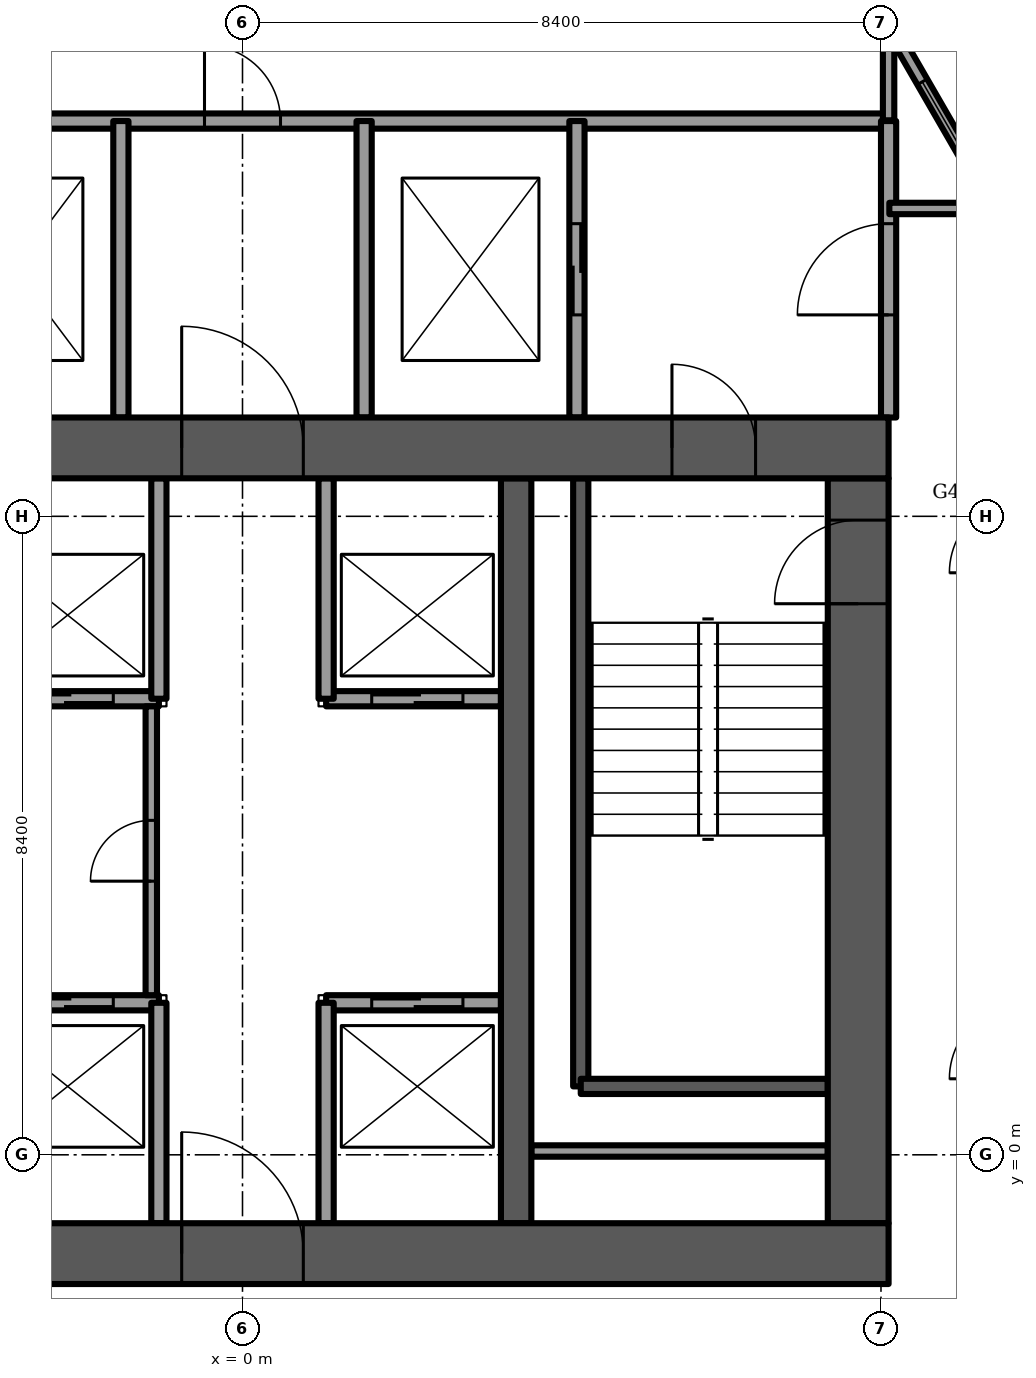
"""IFC4 building model, lengths in metres.
Left out: names, types, materials, properties, quantities, classifications, styles, units other than length and angle.
Written with IfcOpenShell. Run it as: python <this file> out.ifc"""

import sys

from ifc_helpers import new_model, si_unit, direction, frame, frame_2d, origin, place, context, subcontext, project, spatial, rectangle, extrude, element, fill, save


model = new_model("IFC4")
c1 = context("Model", 3, precision=1e-05, world=origin(), true_north=direction((0.0, 1.0)))
c2 = subcontext(c1, "Body", "Model", "MODEL_VIEW")
j1 = project(units=[si_unit("LENGTHUNIT", "METRE"), si_unit("PLANEANGLEUNIT", "RADIAN")], contexts=[c1])
p1 = place(None, origin())
s1 = spatial("IfcSite", under=j1, at=p1, CompositionType="ELEMENT")
p2 = place(p1, origin())
s2 = spatial("IfcBuilding", under=s1, at=p2, CompositionType="ELEMENT")
p3 = place(p2, frame((0.0, 0.0, 179.5)))
s3 = spatial("IfcBuildingStorey", under=s2, at=p3, CompositionType="ELEMENT", Elevation=179.5)
p4 = place(p3, frame((-8.5, -1.3, -0.3), z_axis=(0.0, 0.0, 1.0), x_axis=(1.0, 0.0, 0.0)))
e1 = element("IfcWall", 1, at=p4, inside=s3, PredefinedType="SHEAR", context=c2, shape_type="SweptSolid", body=[
    extrude(rectangle(XDim=17.0, YDim=0.8, at=frame_2d((8.5, 0.0))), origin(), (0.0, 0.0, 1.0), 3.75),
])
p5 = place(p4, frame((7.7, 0.0, 0.0)))
e2 = element("IfcOpeningElement", 2, at=p5, cuts=e1, PredefinedType="OPENING", context=c2, shape_type="SweptSolid", body=[
    extrude(rectangle(XDim=1.6, YDim=2.1, at=frame_2d((0.8, 1.05))), frame((0.0, 0.4, 0.0), z_axis=(0.0, -1.0, 0.0), x_axis=(1.0, 0.0, 0.0)), (0.0, 0.0, 1.0), 0.8),
])
p6 = place(p3, frame((-8.5, 9.3, -0.3), z_axis=(0.0, 0.0, 1.0), x_axis=(1.0, 0.0, 0.0)))
e3 = element("IfcWall", 3, at=p6, inside=s3, PredefinedType="SHEAR", context=c2, shape_type="SweptSolid", body=[
    extrude(rectangle(XDim=17.0, YDim=0.8, at=frame_2d((8.5, 0.0))), origin(), (0.0, 0.0, 1.0), 3.75),
])
p7 = place(p6, frame((7.7, 0.0, 0.0)))
e4 = element("IfcOpeningElement", 4, at=p7, cuts=e3, PredefinedType="OPENING", context=c2, shape_type="SweptSolid", body=[
    extrude(rectangle(XDim=1.6, YDim=2.1, at=frame_2d((0.8, 1.05))), frame((0.0, 0.4, 0.0), z_axis=(0.0, -1.0, 0.0), x_axis=(1.0, 0.0, 0.0)), (0.0, 0.0, 1.0), 0.8),
])
p8 = place(p6, frame((1.75, 0.0, 0.0)))
e5 = element("IfcOpeningElement", 5, at=p8, cuts=e3, PredefinedType="OPENING", context=c2, shape_type="SweptSolid", body=[
    extrude(rectangle(XDim=1.1, YDim=2.1, at=frame_2d((0.55, 1.05))), frame((0.0, 0.4, 0.0), z_axis=(0.0, -1.0, 0.0), x_axis=(1.0, 0.0, 0.0)), (0.0, 0.0, 1.0), 0.8),
])
p9 = place(p6, frame((14.15, 0.0, 0.0)))
e6 = element("IfcOpeningElement", 6, at=p9, cuts=e3, PredefinedType="OPENING", context=c2, shape_type="SweptSolid", body=[
    extrude(rectangle(XDim=1.1, YDim=2.1, at=frame_2d((0.55, 1.05))), frame((0.0, 0.4, 0.0), z_axis=(0.0, -1.0, 0.0), x_axis=(1.0, 0.0, 0.0)), (0.0, 0.0, 1.0), 0.8),
])
p10 = place(p3, frame((8.1, -0.9, -0.3), z_axis=(0.0, 0.0, 1.0), x_axis=(0.0, 1.0, 0.0)))
e7 = element("IfcWall", 7, at=p10, inside=s3, PredefinedType="SHEAR", context=c2, shape_type="SweptSolid", body=[
    extrude(rectangle(XDim=9.8, YDim=0.8, at=frame_2d((4.9, 0.0))), origin(), (0.0, 0.0, 1.0), 3.75),
])
p11 = place(p10, frame((8.15, 0.0, 0.0)))
e8 = element("IfcOpeningElement", 8, at=p11, cuts=e7, PredefinedType="OPENING", context=c2, shape_type="SweptSolid", body=[
    extrude(rectangle(XDim=1.1, YDim=2.1, at=frame_2d((0.55, 1.05))), frame((0.0, 0.4, 0.0), z_axis=(0.0, -1.0, 0.0), x_axis=(1.0, 0.0, 0.0)), (0.0, 0.0, 1.0), 0.8),
])
p12 = place(p3, frame((3.6, -0.9, -0.3), z_axis=(0.0, 0.0, 1.0), x_axis=(0.0, 1.0, 0.0)))
e9 = element("IfcWall", 9, at=p12, inside=s3, PredefinedType="SHEAR", context=c2, shape_type="SweptSolid", body=[
    extrude(rectangle(XDim=9.8, YDim=0.4, at=frame_2d((4.9, 0.0))), origin(), (0.0, 0.0, 1.0), 3.75),
])
p13 = place(p3, frame((17.145, -0.089, 0.0), z_axis=(0.0, 0.0, 1.0), x_axis=(-0.499999728453, 0.866025560562, 0.0)))
e10 = element("IfcWall", 10, at=p13, inside=s3, PredefinedType="SOLIDWALL", context=c2, shape_type="SweptSolid", body=[
    extrude(rectangle(XDim=20.071, YDim=0.15, at=frame_2d((10.035, 0.0))), origin(), (0.0, 0.0, 1.0), 3.45),
])
p14 = place(p13, frame((0.55, 0.0, 0.15)))
e11 = element("IfcOpeningElement", 11, at=p14, cuts=e10, PredefinedType="OPENING", context=c2, shape_type="SweptSolid", body=[
    extrude(rectangle(XDim=1.6, YDim=2.85, at=frame_2d((0.8, 1.425))), frame((0.0, 0.075, 0.0), z_axis=(0.0, -1.0, 0.0), x_axis=(1.0, 0.0, 0.0)), (0.0, 0.0, 1.0), 0.15),
])
p15 = place(p13, frame((2.75, 0.0, 0.15)))
e12 = element("IfcOpeningElement", 12, at=p15, cuts=e10, PredefinedType="OPENING", context=c2, shape_type="SweptSolid", body=[
    extrude(rectangle(XDim=1.4, YDim=2.85, at=frame_2d((0.7, 1.425))), frame((0.0, 0.075, 0.0), z_axis=(0.0, -1.0, 0.0), x_axis=(1.0, 0.0, 0.0)), (0.0, 0.0, 1.0), 0.15),
])
p16 = place(p13, frame((5.854, 0.0, 0.15)))
e13 = element("IfcOpeningElement", 13, at=p16, cuts=e10, PredefinedType="OPENING", context=c2, shape_type="SweptSolid", body=[
    extrude(rectangle(XDim=0.9, YDim=2.85, at=frame_2d((0.45, 1.425))), frame((0.0, 0.075, 0.0), z_axis=(0.0, -1.0, 0.0), x_axis=(1.0, 0.0, 0.0)), (0.0, 0.0, 1.0), 0.15),
])
p17 = place(p13, frame((6.95, 0.0, 0.15)))
e14 = element("IfcOpeningElement", 14, at=p17, cuts=e10, PredefinedType="OPENING", context=c2, shape_type="SweptSolid", body=[
    extrude(rectangle(XDim=1.4, YDim=2.85, at=frame_2d((0.7, 1.425))), frame((0.0, 0.075, 0.0), z_axis=(0.0, -1.0, 0.0), x_axis=(1.0, 0.0, 0.0)), (0.0, 0.0, 1.0), 0.15),
])
p18 = place(p13, frame((8.95, 0.0, 0.15)))
e15 = element("IfcOpeningElement", 15, at=p18, cuts=e10, PredefinedType="OPENING", context=c2, shape_type="SweptSolid", body=[
    extrude(rectangle(XDim=1.6, YDim=2.85, at=frame_2d((0.8, 1.425))), frame((0.0, 0.075, 0.0), z_axis=(0.0, -1.0, 0.0), x_axis=(1.0, 0.0, 0.0)), (0.0, 0.0, 1.0), 0.15),
])
p19 = place(p13, frame((11.15, 0.0, 0.15)))
e16 = element("IfcOpeningElement", 16, at=p19, cuts=e10, PredefinedType="OPENING", context=c2, shape_type="SweptSolid", body=[
    extrude(rectangle(XDim=1.4, YDim=2.85, at=frame_2d((0.7, 1.425))), frame((0.0, 0.075, 0.0), z_axis=(0.0, -1.0, 0.0), x_axis=(1.0, 0.0, 0.0)), (0.0, 0.0, 1.0), 0.15),
])
p20 = place(p13, frame((14.803, 0.0, 0.15)))
e17 = element("IfcOpeningElement", 17, at=p20, cuts=e10, PredefinedType="OPENING", context=c2, shape_type="SweptSolid", body=[
    extrude(rectangle(XDim=1.6, YDim=2.85, at=frame_2d((0.8, 1.425))), frame((0.0, 0.075, 0.0), z_axis=(0.0, -1.0, 0.0), x_axis=(1.0, 0.0, 0.0)), (0.0, 0.0, 1.0), 0.15),
])
p21 = place(p13, frame((18.019, 0.0, 0.15)))
e18 = element("IfcOpeningElement", 18, at=p21, cuts=e10, PredefinedType="OPENING", context=c2, shape_type="SweptSolid", body=[
    extrude(rectangle(XDim=1.6, YDim=2.73, at=frame_2d((0.8, 1.365))), frame((0.0, 0.075, 0.0), z_axis=(0.0, -1.0, 0.0), x_axis=(1.0, 0.0, 0.0)), (0.0, 0.0, 1.0), 0.15),
])
p22 = place(p3, frame((-3.4, 2.0, 0.0), z_axis=(0.0, 0.0, 1.0), x_axis=(1.0, 0.0, 0.0)))
e19 = element("IfcWall", 19, at=p22, inside=s3, PredefinedType="PARTITIONING", context=c2, shape_type="SweptSolid", body=[
    extrude(rectangle(XDim=2.3, YDim=0.2, at=frame_2d((1.15, 0.0))), origin(), (0.0, 0.0, 1.0), 3.45),
])
p23 = place(p22, frame((0.5, 0.0, 0.0)))
e20 = element("IfcOpeningElement", 20, at=p23, cuts=e19, PredefinedType="OPENING", context=c2, shape_type="SweptSolid", body=[
    extrude(rectangle(XDim=1.2, YDim=2.1, at=frame_2d((0.6, 1.05))), frame((0.0, 0.1, 0.0), z_axis=(0.0, -1.0, 0.0), x_axis=(1.0, 0.0, 0.0)), (0.0, 0.0, 1.0), 0.2),
])
p24 = place(p3, frame((-3.4, 6.0, 0.0), z_axis=(0.0, 0.0, 1.0), x_axis=(1.0, 0.0, 0.0)))
e21 = element("IfcWall", 21, at=p24, inside=s3, PredefinedType="PARTITIONING", context=c2, shape_type="SweptSolid", body=[
    extrude(rectangle(XDim=2.3, YDim=0.2, at=frame_2d((1.15, 0.0))), origin(), (0.0, 0.0, 1.0), 3.45),
])
p25 = place(p24, frame((0.5, 0.0, 0.0)))
e22 = element("IfcOpeningElement", 22, at=p25, cuts=e21, PredefinedType="OPENING", context=c2, shape_type="SweptSolid", body=[
    extrude(rectangle(XDim=1.2, YDim=2.1, at=frame_2d((0.6, 1.05))), frame((0.0, 0.1, 0.0), z_axis=(0.0, -1.0, 0.0), x_axis=(1.0, 0.0, 0.0)), (0.0, 0.0, 1.0), 0.2),
])
p26 = place(p3, frame((1.1, 2.0, 0.0), z_axis=(0.0, 0.0, 1.0), x_axis=(1.0, 0.0, 0.0)))
e23 = element("IfcWall", 23, at=p26, inside=s3, PredefinedType="PARTITIONING", context=c2, shape_type="SweptSolid", body=[
    extrude(rectangle(XDim=2.3, YDim=0.2, at=frame_2d((1.15, 0.0))), origin(), (0.0, 0.0, 1.0), 3.45),
])
p27 = place(p26, frame((0.6, 0.0, 0.0)))
e24 = element("IfcOpeningElement", 24, at=p27, cuts=e23, PredefinedType="OPENING", context=c2, shape_type="SweptSolid", body=[
    extrude(rectangle(XDim=1.2, YDim=2.1, at=frame_2d((0.6, 1.05))), frame((0.0, 0.1, 0.0), z_axis=(0.0, -1.0, 0.0), x_axis=(1.0, 0.0, 0.0)), (0.0, 0.0, 1.0), 0.2),
])
p28 = place(p3, frame((1.1, 6.0, 0.0), z_axis=(0.0, 0.0, 1.0), x_axis=(1.0, 0.0, 0.0)))
e25 = element("IfcWall", 25, at=p28, inside=s3, PredefinedType="PARTITIONING", context=c2, shape_type="SweptSolid", body=[
    extrude(rectangle(XDim=2.3, YDim=0.2, at=frame_2d((1.15, 0.0))), origin(), (0.0, 0.0, 1.0), 3.45),
])
p29 = place(p28, frame((0.6, 0.0, 0.0)))
e26 = element("IfcOpeningElement", 26, at=p29, cuts=e25, PredefinedType="OPENING", context=c2, shape_type="SweptSolid", body=[
    extrude(rectangle(XDim=1.2, YDim=2.1, at=frame_2d((0.6, 1.05))), frame((0.0, 0.1, 0.0), z_axis=(0.0, -1.0, 0.0), x_axis=(1.0, 0.0, 0.0)), (0.0, 0.0, 1.0), 0.2),
])
for number, where, z_axis, x_axis in (
    (27, (-1.1, -0.9, 0.0), (0.0, 0.0, 1.0), (0.0, 1.0, 0.0)),
    (28, (1.1, -0.9, 0.0), (0.0, 0.0, 1.0), (0.0, 1.0, 0.0)),
    (29, (-1.1, 6.0, 0.0), (0.0, 0.0, 1.0), (0.0, 1.0, 0.0)),
    (30, (1.1, 6.0, 0.0), (0.0, 0.0, 1.0), (0.0, 1.0, 0.0)),
):
    element("IfcWall", number, at=place(p3, frame(where, z_axis=z_axis, x_axis=x_axis)), inside=s3, PredefinedType="PARTITIONING", context=c2, shape_type="SweptSolid", body=[
        extrude(rectangle(XDim=2.9, YDim=0.2, at=frame_2d((1.45, 0.0))), origin(), (0.0, 0.0, 1.0), 3.45),
    ])
p30 = place(p3, frame((4.45, 0.9, -0.3), z_axis=(0.0, 0.0, 1.0), x_axis=(0.0, 1.0, 0.0)))
e31 = element("IfcWall", 31, at=p30, inside=s3, PredefinedType="SOLIDWALL", context=c2, shape_type="SweptSolid", body=[
    extrude(rectangle(XDim=8.0, YDim=0.2, at=frame_2d((4.0, 0.0))), origin(), (0.0, 0.0, 1.0), 3.75),
])
p31 = place(p3, frame((4.45, 0.9, -0.3), z_axis=(0.0, 0.0, 1.0), x_axis=(1.0, 0.0, 0.0)))
e32 = element("IfcWall", 32, at=p31, inside=s3, PredefinedType="SOLIDWALL", context=c2, shape_type="SweptSolid", body=[
    extrude(rectangle(XDim=3.25, YDim=0.2, at=frame_2d((1.625, 0.0))), origin(), (0.0, 0.0, 1.0), 3.75),
])
p32 = place(p3, frame((3.8, 0.05, 0.0), z_axis=(0.0, 0.0, 1.0), x_axis=(1.0, 0.0, 0.0)))
e33 = element("IfcWall", 33, at=p32, inside=s3, PredefinedType="PARTITIONING", context=c2, shape_type="SweptSolid", body=[
    extrude(rectangle(XDim=3.9, YDim=0.15, at=frame_2d((1.95, 0.0))), origin(), (0.0, 0.0, 1.0), 3.45),
])
p33 = place(p3, frame((-8.5, 13.6, 0.0), z_axis=(0.0, 0.0, 1.0), x_axis=(1.0, 0.0, 0.0)))
e34 = element("IfcWall", 34, at=p33, inside=s3, PredefinedType="PARTITIONING", context=c2, shape_type="SweptSolid", body=[
    extrude(rectangle(XDim=17.0, YDim=0.2, at=frame_2d((8.5, 0.0))), origin(), (0.0, 0.0, 1.0), 3.45),
])
p34 = place(p33, frame((8.0, 0.0, 0.0)))
e35 = element("IfcOpeningElement", 35, at=p34, cuts=e34, PredefinedType="OPENING", context=c2, shape_type="SweptSolid", body=[
    extrude(rectangle(XDim=1.0, YDim=2.1, at=frame_2d((0.5, 1.05))), frame((0.0, 0.1, 0.0), z_axis=(0.0, -1.0, 0.0), x_axis=(1.0, 0.0, 0.0)), (0.0, 0.0, 1.0), 0.2),
])
p35 = place(p3, frame((8.5, 9.7, 0.0), z_axis=(0.0, 0.0, 1.0), x_axis=(0.0, 1.0, 0.0)))
e36 = element("IfcWall", 36, at=p35, inside=s3, PredefinedType="PARTITIONING", context=c2, shape_type="SweptSolid", body=[
    extrude(rectangle(XDim=3.9, YDim=0.2, at=frame_2d((1.95, 0.0))), origin(), (0.0, 0.0, 1.0), 3.45),
])
p36 = place(p35, frame((1.35, 0.0, 0.0)))
e37 = element("IfcOpeningElement", 37, at=p36, cuts=e36, PredefinedType="OPENING", context=c2, shape_type="SweptSolid", body=[
    extrude(rectangle(XDim=1.2, YDim=2.1, at=frame_2d((0.6, 1.05))), frame((0.0, 0.1, 0.0), z_axis=(0.0, -1.0, 0.0), x_axis=(1.0, 0.0, 0.0)), (0.0, 0.0, 1.0), 0.2),
])
p37 = place(p3, frame((4.4, 9.7, 0.0), z_axis=(0.0, 0.0, 1.0), x_axis=(0.0, 1.0, 0.0)))
e38 = element("IfcWall", 38, at=p37, inside=s3, PredefinedType="PARTITIONING", context=c2, shape_type="SweptSolid", body=[
    extrude(rectangle(XDim=3.9, YDim=0.2, at=frame_2d((1.95, 0.0))), origin(), (0.0, 0.0, 1.0), 3.45),
])
p38 = place(p37, frame((1.35, 0.0, 0.0)))
e39 = element("IfcOpeningElement", 39, at=p38, cuts=e38, PredefinedType="OPENING", context=c2, shape_type="SweptSolid", body=[
    extrude(rectangle(XDim=1.2, YDim=2.1, at=frame_2d((0.6, 1.05))), frame((0.0, 0.1, 0.0), z_axis=(0.0, -1.0, 0.0), x_axis=(1.0, 0.0, 0.0)), (0.0, 0.0, 1.0), 0.2),
])
for number, where, z_axis, x_axis in (
    (40, (-1.6, 9.7, 0.0), (0.0, 0.0, 1.0), (0.0, 1.0, 0.0)),
    (41, (1.6, 9.7, 0.0), (0.0, 0.0, 1.0), (0.0, 1.0, 0.0)),
):
    element("IfcWall", number, at=place(p3, frame(where, z_axis=z_axis, x_axis=x_axis)), inside=s3, PredefinedType="PARTITIONING", context=c2, shape_type="SweptSolid", body=[
        extrude(rectangle(XDim=3.9, YDim=0.2, at=frame_2d((1.95, 0.0))), origin(), (0.0, 0.0, 1.0), 3.45),
    ])
p39 = place(p3, frame((-1.2, 2.1, 0.0), z_axis=(0.0, 0.0, 1.0), x_axis=(0.0, 1.0, 0.0)))
e42 = element("IfcWall", 42, at=p39, inside=s3, PredefinedType="PARTITIONING", context=c2, shape_type="SweptSolid", body=[
    extrude(rectangle(XDim=3.8, YDim=0.15, at=frame_2d((1.9, 0.0))), origin(), (0.0, 0.0, 1.0), 3.45),
])
p40 = place(p39, frame((1.5, 0.0, 0.0)))
e43 = element("IfcOpeningElement", 43, at=p40, cuts=e42, PredefinedType="OPENING", context=c2, shape_type="SweptSolid", body=[
    extrude(rectangle(XDim=0.8, YDim=2.1, at=frame_2d((0.4, 1.05))), frame((0.0, 0.075, 0.0), z_axis=(0.0, -1.0, 0.0), x_axis=(1.0, 0.0, 0.0)), (0.0, 0.0, 1.0), 0.15),
])
p41 = place(p3, frame((8.51, 12.45, 0.0), z_axis=(0.0, 0.0, 1.0), x_axis=(1.0, 0.0, 0.0)))
e44 = element("IfcWall", 44, at=p41, inside=s3, PredefinedType="PARTITIONING", context=c2, shape_type="SweptSolid", body=[
    extrude(rectangle(XDim=1.447, YDim=0.15, at=frame_2d((0.724, 0.0))), origin(), (0.0, 0.0, 1.0), 3.45),
])
p42 = place(p3, frame((8.5, 13.61, 0.0), z_axis=(0.0, 0.0, 1.0), x_axis=(0.0, 1.0, 0.0)))
e45 = element("IfcWall", 45, at=p42, inside=s3, PredefinedType="PARTITIONING", context=c2, shape_type="SweptSolid", body=[
    extrude(rectangle(XDim=1.364, YDim=0.15, at=frame_2d((0.682, 0.0))), origin(), (0.0, 0.0, 1.0), 3.45),
])
p43 = place(p20, origin())
e46 = element("IfcWindow", 46, at=p43, inside=s3, PartitioningType="SINGLE_PANEL", PredefinedType="WINDOW", context=c2, shape_type="SweptSolid", body=[
    extrude(rectangle(XDim=1.6, YDim=2.85, at=frame_2d((0.8, 1.425))), frame((0.0, 0.03, 0.0), z_axis=(0.0, -1.0, 0.0), x_axis=(1.0, 0.0, 0.0)), (0.0, 0.0, 1.0), 0.06),
])
fill(e17, e46)
p44 = place(p23, origin())
e47 = element("IfcDoor", 47, at=p44, inside=s3, OperationType="SLIDING_TO_LEFT", PredefinedType="DOOR", context=c2, shape_type="SweptSolid", body=[
    extrude(rectangle(XDim=1.2, YDim=2.1, at=frame_2d((0.6, 1.05))), frame((0.0, 0.025, 0.0), z_axis=(0.0, -1.0, 0.0), x_axis=(1.0, 0.0, 0.0)), (0.0, 0.0, 1.0), 0.05),
])
fill(e20, e47)
p45 = place(p27, origin())
e48 = element("IfcDoor", 48, at=p45, inside=s3, OperationType="SLIDING_TO_LEFT", PredefinedType="DOOR", context=c2, shape_type="SweptSolid", body=[
    extrude(rectangle(XDim=1.2, YDim=2.1, at=frame_2d((0.6, 1.05))), frame((0.0, 0.025, 0.0), z_axis=(0.0, -1.0, 0.0), x_axis=(1.0, 0.0, 0.0)), (0.0, 0.0, 1.0), 0.05),
])
fill(e24, e48)
p46 = place(p25, origin())
e49 = element("IfcDoor", 49, at=p46, inside=s3, OperationType="SLIDING_TO_LEFT", PredefinedType="DOOR", context=c2, shape_type="SweptSolid", body=[
    extrude(rectangle(XDim=1.2, YDim=2.1, at=frame_2d((0.6, 1.05))), frame((0.0, 0.025, 0.0), z_axis=(0.0, -1.0, 0.0), x_axis=(1.0, 0.0, 0.0)), (0.0, 0.0, 1.0), 0.05),
])
fill(e22, e49)
p47 = place(p29, origin())
e50 = element("IfcDoor", 50, at=p47, inside=s3, OperationType="SLIDING_TO_LEFT", PredefinedType="DOOR", context=c2, shape_type="SweptSolid", body=[
    extrude(rectangle(XDim=1.2, YDim=2.1, at=frame_2d((0.6, 1.05))), frame((0.0, 0.025, 0.0), z_axis=(0.0, -1.0, 0.0), x_axis=(1.0, 0.0, 0.0)), (0.0, 0.0, 1.0), 0.05),
])
fill(e26, e50)
p48 = place(p5, origin())
e51 = element("IfcDoor", 51, at=p48, inside=s3, OperationType="DOUBLE_DOOR_SINGLE_SWING", PredefinedType="DOOR", context=c2, shape_type="SweptSolid", body=[
    extrude(rectangle(XDim=1.6, YDim=2.1, at=frame_2d((0.8, 1.05))), frame((0.0, 0.025, 0.0), z_axis=(0.0, -1.0, 0.0), x_axis=(1.0, 0.0, 0.0)), (0.0, 0.0, 1.0), 0.05),
])
fill(e2, e51)
p49 = place(p7, origin())
e52 = element("IfcDoor", 52, at=p49, inside=s3, OperationType="DOUBLE_DOOR_SINGLE_SWING", PredefinedType="DOOR", context=c2, shape_type="SweptSolid", body=[
    extrude(rectangle(XDim=1.6, YDim=2.1, at=frame_2d((0.8, 1.05))), frame((0.0, 0.025, 0.0), z_axis=(0.0, -1.0, 0.0), x_axis=(1.0, 0.0, 0.0)), (0.0, 0.0, 1.0), 0.05),
])
fill(e4, e52)
p50 = place(p9, origin())
e53 = element("IfcDoor", 53, at=p50, inside=s3, OperationType="SINGLE_SWING_RIGHT", PredefinedType="DOOR", context=c2, shape_type="SweptSolid", body=[
    extrude(rectangle(XDim=1.1, YDim=2.1, at=frame_2d((0.55, 1.05))), frame((0.0, 0.025, 0.0), z_axis=(0.0, -1.0, 0.0), x_axis=(1.0, 0.0, 0.0)), (0.0, 0.0, 1.0), 0.05),
])
fill(e6, e53)
p51 = place(p11, origin())
e54 = element("IfcDoor", 54, at=p51, inside=s3, OperationType="SINGLE_SWING_LEFT", PredefinedType="DOOR", context=c2, shape_type="SweptSolid", body=[
    extrude(rectangle(XDim=1.1, YDim=2.1, at=frame_2d((0.55, 1.05))), frame((0.0, 0.025, 0.0), z_axis=(0.0, -1.0, 0.0), x_axis=(1.0, 0.0, 0.0)), (0.0, 0.0, 1.0), 0.05),
])
fill(e8, e54)
p52 = place(p38, origin())
e55 = element("IfcDoor", 55, at=p52, inside=s3, OperationType="SLIDING_TO_LEFT", PredefinedType="DOOR", context=c2, shape_type="SweptSolid", body=[
    extrude(rectangle(XDim=1.2, YDim=2.1, at=frame_2d((0.6, 1.05))), frame((0.0, 0.025, 0.0), z_axis=(0.0, -1.0, 0.0), x_axis=(1.0, 0.0, 0.0)), (0.0, 0.0, 1.0), 0.05),
])
fill(e39, e55)
p53 = place(p36, origin())
e56 = element("IfcDoor", 56, at=p53, inside=s3, OperationType="SINGLE_SWING_LEFT", PredefinedType="DOOR", context=c2, shape_type="SweptSolid", body=[
    extrude(rectangle(XDim=1.2, YDim=2.1, at=frame_2d((0.6, 1.05))), frame((0.0, 0.025, 0.0), z_axis=(0.0, -1.0, 0.0), x_axis=(1.0, 0.0, 0.0)), (0.0, 0.0, 1.0), 0.05),
])
fill(e37, e56)
p54 = place(p34, origin())
e57 = element("IfcDoor", 57, at=p54, inside=s3, OperationType="SINGLE_SWING_LEFT", PredefinedType="DOOR", context=c2, shape_type="SweptSolid", body=[
    extrude(rectangle(XDim=1.0, YDim=2.1, at=frame_2d((0.5, 1.05))), frame((0.0, 0.025, 0.0), z_axis=(0.0, -1.0, 0.0), x_axis=(1.0, 0.0, 0.0)), (0.0, 0.0, 1.0), 0.05),
])
fill(e35, e57)
p55 = place(p40, origin())
e58 = element("IfcDoor", 58, at=p55, inside=s3, OperationType="SINGLE_SWING_LEFT", PredefinedType="DOOR", context=c2, shape_type="SweptSolid", body=[
    extrude(rectangle(XDim=0.8, YDim=2.1, at=frame_2d((0.4, 1.05))), frame((0.0, 0.025, 0.0), z_axis=(0.0, -1.0, 0.0), x_axis=(1.0, 0.0, 0.0)), (0.0, 0.0, 1.0), 0.05),
])
fill(e43, e58)
save(model, sys.argv[1])
